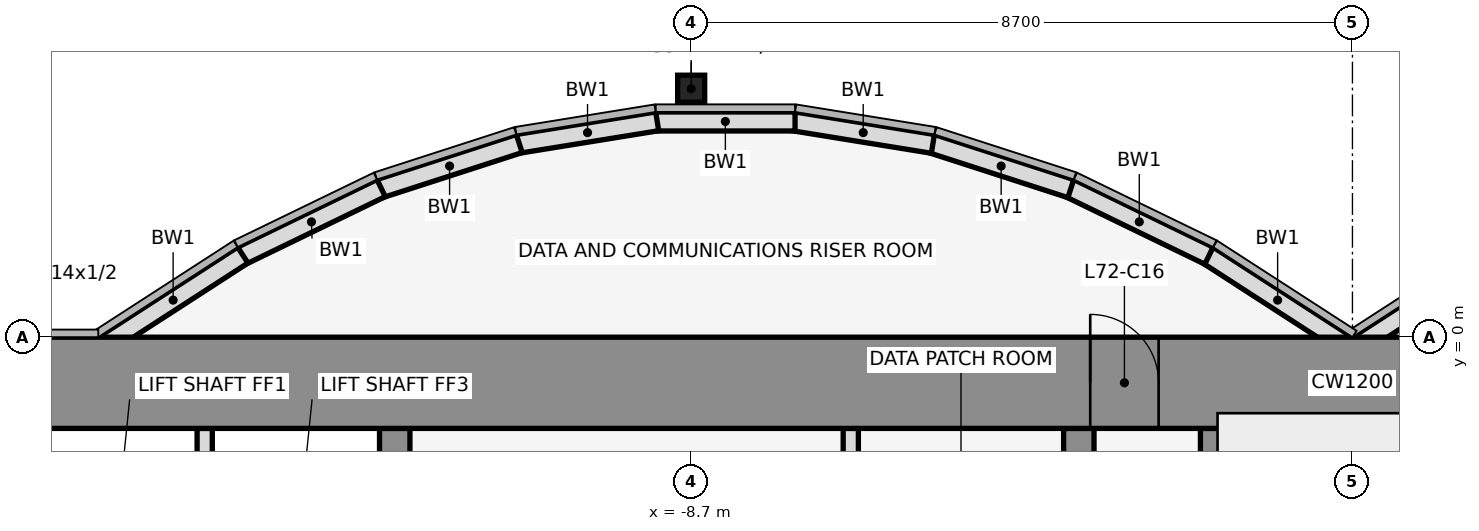
"""IFC4 building model, lengths in metres.
Left out: names, types, materials, properties, quantities, classifications, styles, units other than length and angle.
Written with IfcOpenShell. Run it as: python <this file> out.ifc"""

import sys

from ifc_helpers import new_model, si_unit, direction, frame, frame_2d, origin, origin_2d, place, context, subcontext, project, spatial, rectangle, hollow_rectangle, extrude, element, fill, save


model = new_model("IFC4")
c1 = context("Model", 3, precision=1e-05, world=origin(), true_north=direction((0.0, 1.0)))
c2 = subcontext(c1, "Body", "Model", "MODEL_VIEW")
j1 = project(units=[si_unit("LENGTHUNIT", "METRE"), si_unit("PLANEANGLEUNIT", "RADIAN")], contexts=[c1])
p1 = place(None, origin())
s1 = spatial("IfcSite", under=j1, at=p1, CompositionType="ELEMENT")
p2 = place(p1, origin())
s2 = spatial("IfcBuilding", under=s1, at=p2, CompositionType="ELEMENT")
p3 = place(p2, frame((0.0, 0.0, 320.0)))
s3 = spatial("IfcBuildingStorey", under=s2, at=p3, CompositionType="ELEMENT", Elevation=320.0)
p4 = place(p3, frame((-8.7, 3.269, 0.0), z_axis=(0.0, 0.0, 1.0), x_axis=(1.0, 0.0, 0.0)))
e1 = element("IfcColumn", 1, at=p4, inside=s3, PredefinedType="COLUMN", context=c2, shape_type="SweptSolid", body=[
    extrude(hollow_rectangle(XDim=0.356, YDim=0.356, WallThickness=0.012, at=origin_2d()), origin(), (0.0, 0.0, 1.0), 4.5),
])
for number, where, z_axis, x_axis in (
    (2, (1.901, 1.08, 0.0), (0.0, 0.0, 1.0), (-0.84, -0.543, 0.0)),
    (3, (-0.068, -0.105, 0.0), (0.0, 0.0, 1.0), (-0.84, 0.543, 0.0)),
):
    element("IfcWall", number, at=place(p3, frame(where, z_axis=z_axis, x_axis=x_axis)), inside=s3, PredefinedType="STANDARD", context=c2, shape_type="SweptSolid", body=[
        extrude(rectangle(XDim=2.183, YDim=0.25, at=frame_2d((1.091, 0.0))), origin(), (0.0, 0.0, 1.0), 4.35),
    ])
p5 = place(p3, frame((-1.888, 1.073, 0.0), z_axis=(0.0, 0.0, 1.0), x_axis=(-0.89982408427, 0.436252928206, 0.0)))
e4 = element("IfcWall", 4, at=p5, inside=s3, PredefinedType="STANDARD", context=c2, shape_type="SweptSolid", body=[
    extrude(rectangle(XDim=2.038, YDim=0.25, at=frame_2d((1.019, 0.0))), origin(), (0.0, 0.0, 1.0), 4.35),
])
p6 = place(p3, frame((-3.705, 1.955, 0.0), z_axis=(0.0, 0.0, 1.0), x_axis=(-0.951495806175, 0.307661714928, 0.0)))
e5 = element("IfcWall", 5, at=p6, inside=s3, PredefinedType="STANDARD", context=c2, shape_type="SweptSolid", body=[
    extrude(rectangle(XDim=1.927, YDim=0.25, at=frame_2d((0.963, 0.0))), origin(), (0.0, 0.0, 1.0), 4.35),
])
p7 = place(p3, frame((-5.52, 2.543, 0.0), z_axis=(0.0, 0.0, 1.0), x_axis=(-0.987181718931, 0.159600293885, 0.0)))
e6 = element("IfcWall", 6, at=p7, inside=s3, PredefinedType="STANDARD", context=c2, shape_type="SweptSolid", body=[
    extrude(rectangle(XDim=1.857, YDim=0.25, at=frame_2d((0.929, 0.0))), origin(), (0.0, 0.0, 1.0), 4.35),
])
p8 = place(p3, frame((-7.333, 2.838, 0.0), z_axis=(0.0, 0.0, 1.0), x_axis=(-1.0, 0.0, 0.0)))
e7 = element("IfcWall", 7, at=p8, inside=s3, PredefinedType="STANDARD", context=c2, shape_type="SweptSolid", body=[
    extrude(rectangle(XDim=1.833, YDim=0.25, at=frame_2d((0.917, 0.0))), origin(), (0.0, 0.0, 1.0), 4.35),
])
p9 = place(p3, frame((-9.147, 2.84, 0.0), z_axis=(0.0, 0.0, 1.0), x_axis=(-0.987181718931, -0.159600293885, 0.0)))
e8 = element("IfcWall", 8, at=p9, inside=s3, PredefinedType="STANDARD", context=c2, shape_type="SweptSolid", body=[
    extrude(rectangle(XDim=1.857, YDim=0.25, at=frame_2d((0.929, 0.0))), origin(), (0.0, 0.0, 1.0), 4.35),
])
p10 = place(p3, frame((-10.962, 2.548, 0.0), z_axis=(0.0, 0.0, 1.0), x_axis=(-0.951495806175, -0.307661714928, 0.0)))
e9 = element("IfcWall", 9, at=p10, inside=s3, PredefinedType="STANDARD", context=c2, shape_type="SweptSolid", body=[
    extrude(rectangle(XDim=1.927, YDim=0.25, at=frame_2d((0.963, 0.0))), origin(), (0.0, 0.0, 1.0), 4.35),
])
p11 = place(p3, frame((-12.779, 1.962, 0.0), z_axis=(0.0, 0.0, 1.0), x_axis=(-0.89982408427, -0.436252928206, 0.0)))
e10 = element("IfcWall", 10, at=p11, inside=s3, PredefinedType="STANDARD", context=c2, shape_type="SweptSolid", body=[
    extrude(rectangle(XDim=2.038, YDim=0.25, at=frame_2d((1.019, 0.0))), origin(), (0.0, 0.0, 1.0), 4.35),
])
p12 = place(p3, frame((-14.599, 1.08, 0.0), z_axis=(0.0, 0.0, 1.0), x_axis=(-0.83981312244, -0.542875602121, 0.0)))
e11 = element("IfcWall", 11, at=p12, inside=s3, PredefinedType="STANDARD", context=c2, shape_type="SweptSolid", body=[
    extrude(rectangle(XDim=2.183, YDim=0.25, at=frame_2d((1.091, 0.0))), origin(), (0.0, 0.0, 1.0), 4.35),
])
p13 = place(p3, frame((-15.1, -4.6, 0.0), z_axis=(0.0, 0.0, 1.0), x_axis=(0.0, 1.0, 0.0)))
e12 = element("IfcWall", 12, at=p13, inside=s3, PredefinedType="PARTITIONING", context=c2, shape_type="SweptSolid", body=[
    extrude(rectangle(XDim=3.4, YDim=0.2, at=frame_2d((1.7, 0.0))), origin(), (0.0, 0.0, 1.0), 3.418),
])
p14 = place(p3, frame((-12.6, -11.8, 0.0), z_axis=(0.0, 0.0, 1.0), x_axis=(0.0, 1.0, 0.0)))
e13 = element("IfcWall", 13, at=p14, inside=s3, PredefinedType="SHEAR", context=c2, shape_type="SweptSolid", body=[
    extrude(rectangle(XDim=10.6, YDim=0.4, at=frame_2d((5.3, 0.0))), origin(), (0.0, 0.0, 1.0), 4.5),
])
p15 = place(p14, frame((4.75, 0.0, 0.0)))
e14 = element("IfcOpeningElement", 14, at=p15, cuts=e13, PredefinedType="OPENING", context=c2, shape_type="SweptSolid", body=[
    extrude(rectangle(XDim=1.1, YDim=2.1, at=frame_2d((0.55, 1.05))), frame((0.0, 0.212, 0.0), z_axis=(0.0, -1.0, 0.0), x_axis=(1.0, 0.0, 0.0)), (0.0, 0.0, 1.0), 0.424),
])
p16 = place(p3, frame((-6.6, -4.6, 0.0), z_axis=(0.0, 0.0, 1.0), x_axis=(0.0, 1.0, 0.0)))
e15 = element("IfcWall", 15, at=p16, inside=s3, PredefinedType="PARTITIONING", context=c2, shape_type="SweptSolid", body=[
    extrude(rectangle(XDim=3.4, YDim=0.2, at=frame_2d((1.7, 0.0))), origin(), (0.0, 0.0, 1.0), 3.418),
])
p17 = place(p3, frame((-3.6, -11.8, 0.0), z_axis=(0.0, 0.0, 1.0), x_axis=(0.0, 1.0, 0.0)))
e16 = element("IfcWall", 16, at=p17, inside=s3, PredefinedType="SHEAR", context=c2, shape_type="SweptSolid", body=[
    extrude(rectangle(XDim=10.6, YDim=0.4, at=frame_2d((5.3, 0.0))), origin(), (0.0, 0.0, 1.0), 4.5),
])
p18 = place(p17, frame((4.85, 0.0, 0.0)))
e17 = element("IfcOpeningElement", 17, at=p18, cuts=e16, PredefinedType="OPENING", context=c2, shape_type="SweptSolid", body=[
    extrude(rectangle(XDim=0.9, YDim=2.1, at=frame_2d((0.45, 1.05))), frame((0.0, 0.212, 0.0), z_axis=(0.0, -1.0, 0.0), x_axis=(1.0, 0.0, 0.0)), (0.0, 0.0, 1.0), 0.424),
])
p19 = place(p3, frame((-1.8, -11.8, 0.0), z_axis=(0.0, 0.0, 1.0), x_axis=(0.0, 1.0, 0.0)))
e18 = element("IfcWall", 18, at=p19, inside=s3, PredefinedType="SHEAR", context=c2, shape_type="SweptSolid", body=[
    extrude(rectangle(XDim=10.6, YDim=0.4, at=frame_2d((5.3, 0.0))), origin(), (0.0, 0.0, 1.0), 4.5),
])
p20 = place(p3, frame((-22.0, -0.6, 0.0), z_axis=(0.0, 0.0, 1.0), x_axis=(1.0, 0.0, 0.0)))
e19 = element("IfcWall", 19, at=p20, inside=s3, PredefinedType="SHEAR", context=c2, shape_type="SweptSolid", body=[
    extrude(rectangle(XDim=44.0, YDim=1.2, at=frame_2d((22.0, 0.0))), origin(), (0.0, 0.0, 1.0), 4.5),
])
p21 = place(p20, frame((18.55, 0.0, 0.0)))
e20 = element("IfcOpeningElement", 20, at=p21, cuts=e19, PredefinedType="OPENING", context=c2, shape_type="SweptSolid", body=[
    extrude(rectangle(XDim=0.9, YDim=2.1, at=frame_2d((0.45, 1.05))), frame((0.0, 0.612, 0.0), z_axis=(0.0, -1.0, 0.0), x_axis=(1.0, 0.0, 0.0)), (0.0, 0.0, 1.0), 1.224),
])
p22 = place(p20, frame((24.55, 0.0, 0.0)))
e21 = element("IfcOpeningElement", 21, at=p22, cuts=e19, PredefinedType="OPENING", context=c2, shape_type="SweptSolid", body=[
    extrude(rectangle(XDim=0.9, YDim=2.1, at=frame_2d((0.45, 1.05))), frame((0.0, 0.612, 0.0), z_axis=(0.0, -1.0, 0.0), x_axis=(1.0, 0.0, 0.0)), (0.0, 0.0, 1.0), 1.224),
])
p23 = place(p21, origin())
e22 = element("IfcDoor", 22, at=p23, inside=s3, OperationType="SINGLE_SWING_LEFT", PredefinedType="DOOR", context=c2, shape_type="SweptSolid", body=[
    extrude(rectangle(XDim=0.9, YDim=2.1, at=frame_2d((0.45, 1.05))), frame((0.0, 0.025, 0.0), z_axis=(0.0, -1.0, 0.0), x_axis=(1.0, 0.0, 0.0)), (0.0, 0.0, 1.0), 0.05),
])
fill(e20, e22)
save(model, sys.argv[1])
